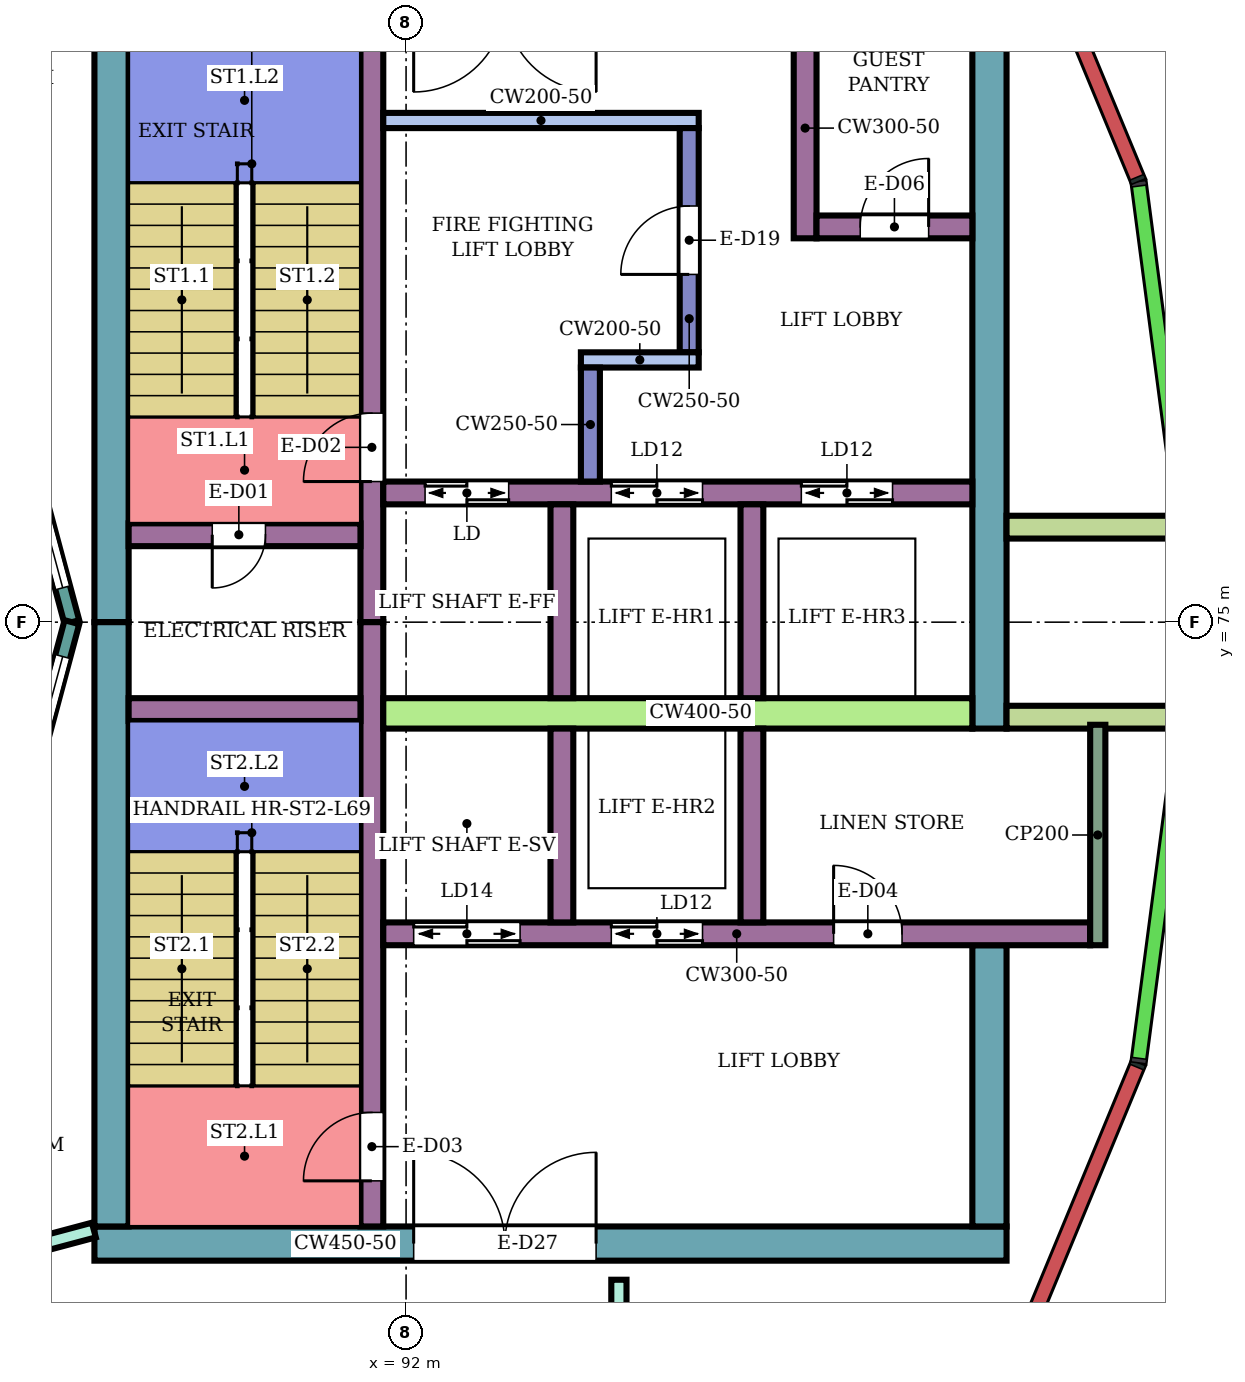
"""IFC4 building model, lengths in metres.
Left out: names, types, materials, properties, quantities, classifications, styles, units other than length and angle.
Written with IfcOpenShell. Run it as: python <this file> out.ifc"""

import sys

from ifc_helpers import new_model, si_unit, direction, frame, frame_2d, origin, place, context, subcontext, project, spatial, rectangle, extrude, element, fill, save


model = new_model("IFC4")
c1 = context("Model", 3, precision=1e-05, world=origin(), true_north=direction((0.0, 1.0)))
c2 = subcontext(c1, "Body", "Model", "MODEL_VIEW")
j1 = project(units=[si_unit("LENGTHUNIT", "METRE"), si_unit("PLANEANGLEUNIT", "RADIAN")], contexts=[c1])
p1 = place(None, origin())
s1 = spatial("IfcSite", under=j1, at=p1, CompositionType="ELEMENT")
p2 = place(p1, origin())
s2 = spatial("IfcBuilding", under=s1, at=p2, CompositionType="ELEMENT")
p3 = place(p2, frame((0.0, 0.0, 300.9)))
s3 = spatial("IfcBuildingStorey", under=s2, at=p3, CompositionType="ELEMENT", Elevation=300.9)
p4 = place(p3, frame((87.9, 66.825, 0.0), z_axis=(0.0, 0.0, 1.0), x_axis=(1.0, 0.0, 0.0)))
e1 = element("IfcWall", 1, at=p4, inside=s3, PredefinedType="SHEAR", context=c2, shape_type="SweptSolid", body=[
    extrude(rectangle(XDim=12.0, YDim=0.45, at=frame_2d((6.0, 0.0))), origin(), (0.0, 0.0, 1.0), 3.88),
])
p5 = place(p4, frame((4.2, 0.0, 0.0)))
e2 = element("IfcOpeningElement", 2, at=p5, cuts=e1, PredefinedType="OPENING", context=c2, shape_type="SweptSolid", body=[
    extrude(rectangle(XDim=2.4, YDim=2.4, at=frame_2d((1.2, 1.2))), frame((0.0, 0.235, 0.0), z_axis=(0.0, -1.0, 0.0), x_axis=(1.0, 0.0, 0.0)), (0.0, 0.0, 1.0), 0.47),
])
for number, where, z_axis, x_axis in (
    (3, (88.125, 75.0, 0.0), (0.0, 0.0, 1.0), (0.0, 1.0, 0.0)),
    (4, (88.125, 67.05, 0.0), (0.0, 0.0, 1.0), (0.0, 1.0, 0.0)),
):
    element("IfcWall", number, at=place(p3, frame(where, z_axis=z_axis, x_axis=x_axis)), inside=s3, PredefinedType="SHEAR", context=c2, shape_type="SweptSolid", body=[
        extrude(rectangle(XDim=7.95, YDim=0.45, at=frame_2d((3.975, 0.0))), origin(), (0.0, 0.0, 1.0), 3.88),
    ])
p6 = place(p3, frame((99.675, 73.6, 0.0), z_axis=(0.0, 0.0, 1.0), x_axis=(0.0, 1.0, 0.0)))
e5 = element("IfcWall", 5, at=p6, inside=s3, PredefinedType="SHEAR", context=c2, shape_type="SweptSolid", body=[
    extrude(rectangle(XDim=9.35, YDim=0.45, at=frame_2d((4.675, 0.0))), origin(), (0.0, 0.0, 1.0), 3.88),
])
p7 = place(p3, frame((99.675, 67.05, 0.0), z_axis=(0.0, 0.0, 1.0), x_axis=(0.0, 1.0, 0.0)))
e6 = element("IfcWall", 6, at=p7, inside=s3, PredefinedType="SHEAR", context=c2, shape_type="SweptSolid", body=[
    extrude(rectangle(XDim=3.7, YDim=0.45, at=frame_2d((1.85, 0.0))), origin(), (0.0, 0.0, 1.0), 3.88),
])
p8 = place(p3, frame((91.55, 75.0, 0.0), z_axis=(0.0, 0.0, 1.0), x_axis=(0.0, 1.0, 0.0)))
e7 = element("IfcWall", 7, at=p8, inside=s3, PredefinedType="SHEAR", context=c2, shape_type="SweptSolid", body=[
    extrude(rectangle(XDim=7.95, YDim=0.3, at=frame_2d((3.975, 0.0))), origin(), (0.0, 0.0, 1.0), 3.88),
])
p9 = place(p8, frame((1.85, 0.0, 0.0)))
e8 = element("IfcOpeningElement", 8, at=p9, cuts=e7, PredefinedType="OPENING", context=c2, shape_type="SweptSolid", body=[
    extrude(rectangle(XDim=0.9, YDim=2.1, at=frame_2d((0.45, 1.05))), frame((0.0, 0.16, 0.0), z_axis=(0.0, -1.0, 0.0), x_axis=(1.0, 0.0, 0.0)), (0.0, 0.0, 1.0), 0.32),
])
p10 = place(p3, frame((91.55, 67.05, 0.0), z_axis=(0.0, 0.0, 1.0), x_axis=(0.0, 1.0, 0.0)))
e9 = element("IfcWall", 9, at=p10, inside=s3, PredefinedType="SHEAR", context=c2, shape_type="SweptSolid", body=[
    extrude(rectangle(XDim=7.95, YDim=0.3, at=frame_2d((3.975, 0.0))), origin(), (0.0, 0.0, 1.0), 3.88),
])
p11 = place(p10, frame((0.6, 0.0, 0.0)))
e10 = element("IfcOpeningElement", 10, at=p11, cuts=e9, PredefinedType="OPENING", context=c2, shape_type="SweptSolid", body=[
    extrude(rectangle(XDim=0.9, YDim=2.1, at=frame_2d((0.45, 1.05))), frame((0.0, 0.16, 0.0), z_axis=(0.0, -1.0, 0.0), x_axis=(1.0, 0.0, 0.0)), (0.0, 0.0, 1.0), 0.32),
])
p12 = place(p3, frame((88.35, 76.15, 0.0), z_axis=(0.0, 0.0, 1.0), x_axis=(1.0, 0.0, 0.0)))
e11 = element("IfcWall", 11, at=p12, inside=s3, PredefinedType="SHEAR", context=c2, shape_type="SweptSolid", body=[
    extrude(rectangle(XDim=3.05, YDim=0.3, at=frame_2d((1.525, 0.0))), origin(), (0.0, 0.0, 1.0), 3.88),
])
p13 = place(p12, frame((1.1, 0.0, 0.0)))
e12 = element("IfcOpeningElement", 12, at=p13, cuts=e11, PredefinedType="OPENING", context=c2, shape_type="SweptSolid", body=[
    extrude(rectangle(XDim=0.7, YDim=2.0, at=frame_2d((0.35, 1.0))), frame((0.0, 0.16, 0.0), z_axis=(0.0, -1.0, 0.0), x_axis=(1.0, 0.0, 0.0)), (0.0, 0.0, 1.0), 0.32),
])
p14 = place(p3, frame((88.35, 73.85, 0.0), z_axis=(0.0, 0.0, 1.0), x_axis=(1.0, 0.0, 0.0)))
e13 = element("IfcWall", 13, at=p14, inside=s3, PredefinedType="SHEAR", context=c2, shape_type="SweptSolid", body=[
    extrude(rectangle(XDim=3.05, YDim=0.3, at=frame_2d((1.525, 0.0))), origin(), (0.0, 0.0, 1.0), 3.88),
])
p15 = place(p3, frame((91.7, 76.7, 0.0), z_axis=(0.0, 0.0, 1.0), x_axis=(1.0, 0.0, 0.0)))
e14 = element("IfcWall", 14, at=p15, inside=s3, PredefinedType="SHEAR", context=c2, shape_type="SweptSolid", body=[
    extrude(rectangle(XDim=7.75, YDim=0.3, at=frame_2d((3.875, 0.0))), origin(), (0.0, 0.0, 1.0), 3.88),
])
p16 = place(p15, frame((0.55, 0.0, 0.0)))
e15 = element("IfcOpeningElement", 15, at=p16, cuts=e14, PredefinedType="OPENING", context=c2, shape_type="SweptSolid", body=[
    extrude(rectangle(XDim=1.1, YDim=2.1, at=frame_2d((0.55, 1.05))), frame((0.0, 0.16, 0.0), z_axis=(0.0, -1.0, 0.0), x_axis=(1.0, 0.0, 0.0)), (0.0, 0.0, 1.0), 0.32),
])
p17 = place(p15, frame((3.0, 0.0, 0.0)))
e16 = element("IfcOpeningElement", 16, at=p17, cuts=e14, PredefinedType="OPENING", context=c2, shape_type="SweptSolid", body=[
    extrude(rectangle(XDim=1.2, YDim=2.1, at=frame_2d((0.6, 1.05))), frame((0.0, 0.16, 0.0), z_axis=(0.0, -1.0, 0.0), x_axis=(1.0, 0.0, 0.0)), (0.0, 0.0, 1.0), 0.32),
])
p18 = place(p15, frame((5.5, 0.0, 0.0)))
e17 = element("IfcOpeningElement", 17, at=p18, cuts=e14, PredefinedType="OPENING", context=c2, shape_type="SweptSolid", body=[
    extrude(rectangle(XDim=1.2, YDim=2.1, at=frame_2d((0.6, 1.05))), frame((0.0, 0.16, 0.0), z_axis=(0.0, -1.0, 0.0), x_axis=(1.0, 0.0, 0.0)), (0.0, 0.0, 1.0), 0.32),
])
p19 = place(p3, frame((91.7, 73.8, 0.0), z_axis=(0.0, 0.0, 1.0), x_axis=(1.0, 0.0, 0.0)))
e18 = element("IfcWall", 18, at=p19, inside=s3, PredefinedType="SHEAR", context=c2, shape_type="SweptSolid", body=[
    extrude(rectangle(XDim=7.75, YDim=0.4, at=frame_2d((3.875, 0.0))), origin(), (0.0, 0.0, 1.0), 3.88),
])
p20 = place(p3, frame((91.7, 70.9, 0.0), z_axis=(0.0, 0.0, 1.0), x_axis=(1.0, 0.0, 0.0)))
e19 = element("IfcWall", 19, at=p20, inside=s3, PredefinedType="SHEAR", context=c2, shape_type="SweptSolid", body=[
    extrude(rectangle(XDim=9.3, YDim=0.3, at=frame_2d((4.65, 0.0))), origin(), (0.0, 0.0, 1.0), 3.88),
])
p21 = place(p20, frame((0.4, 0.0, 0.0)))
e20 = element("IfcOpeningElement", 20, at=p21, cuts=e19, PredefinedType="OPENING", context=c2, shape_type="SweptSolid", body=[
    extrude(rectangle(XDim=1.4, YDim=2.1, at=frame_2d((0.7, 1.05))), frame((0.0, 0.16, 0.0), z_axis=(0.0, -1.0, 0.0), x_axis=(1.0, 0.0, 0.0)), (0.0, 0.0, 1.0), 0.32),
])
p22 = place(p20, frame((3.0, 0.0, 0.0)))
e21 = element("IfcOpeningElement", 21, at=p22, cuts=e19, PredefinedType="OPENING", context=c2, shape_type="SweptSolid", body=[
    extrude(rectangle(XDim=1.2, YDim=2.1, at=frame_2d((0.6, 1.05))), frame((0.0, 0.16, 0.0), z_axis=(0.0, -1.0, 0.0), x_axis=(1.0, 0.0, 0.0)), (0.0, 0.0, 1.0), 0.32),
])
p23 = place(p20, frame((5.925, 0.0, 0.0)))
e22 = element("IfcOpeningElement", 22, at=p23, cuts=e19, PredefinedType="OPENING", context=c2, shape_type="SweptSolid", body=[
    extrude(rectangle(XDim=0.9, YDim=2.1, at=frame_2d((0.45, 1.05))), frame((0.0, 0.16, 0.0), z_axis=(0.0, -1.0, 0.0), x_axis=(1.0, 0.0, 0.0)), (0.0, 0.0, 1.0), 0.32),
])
for number, where, z_axis, x_axis in (
    (23, (94.05, 74.0, 0.0), (0.0, 0.0, 1.0), (0.0, 1.0, 0.0)),
    (24, (96.55, 74.0, 0.0), (0.0, 0.0, 1.0), (0.0, 1.0, 0.0)),
    (25, (94.05, 71.05, 0.0), (0.0, 0.0, 1.0), (0.0, 1.0, 0.0)),
    (26, (96.55, 71.05, 0.0), (0.0, 0.0, 1.0), (0.0, 1.0, 0.0)),
):
    element("IfcWall", number, at=place(p3, frame(where, z_axis=z_axis, x_axis=x_axis)), inside=s3, PredefinedType="SHEAR", context=c2, shape_type="SweptSolid", body=[
        extrude(rectangle(XDim=2.55, YDim=0.3, at=frame_2d((1.275, 0.0))), origin(), (0.0, 0.0, 1.0), 3.88),
    ])
p24 = place(p3, frame((91.7, 81.6, 0.0), z_axis=(0.0, 0.0, 1.0), x_axis=(1.0, 0.0, 0.0)))
e27 = element("IfcWall", 27, at=p24, inside=s3, PredefinedType="SHEAR", context=c2, shape_type="SweptSolid", body=[
    extrude(rectangle(XDim=4.15, YDim=0.2, at=frame_2d((2.075, 0.0))), origin(), (0.0, 0.0, 1.0), 3.88),
])
p25 = place(p3, frame((95.725, 78.55, 0.0), z_axis=(0.0, 0.0, 1.0), x_axis=(0.0, 1.0, 0.0)))
e28 = element("IfcWall", 28, at=p25, inside=s3, PredefinedType="SHEAR", context=c2, shape_type="SweptSolid", body=[
    extrude(rectangle(XDim=2.95, YDim=0.25, at=frame_2d((1.475, 0.0))), origin(), (0.0, 0.0, 1.0), 3.88),
])
p26 = place(p25, frame((1.025, 0.0, 0.0)))
e29 = element("IfcOpeningElement", 29, at=p26, cuts=e28, PredefinedType="OPENING", context=c2, shape_type="SweptSolid", body=[
    extrude(rectangle(XDim=0.9, YDim=2.1, at=frame_2d((0.45, 1.05))), frame((0.0, 0.135, 0.0), z_axis=(0.0, -1.0, 0.0), x_axis=(1.0, 0.0, 0.0)), (0.0, 0.0, 1.0), 0.27),
])
p27 = place(p3, frame((94.3, 78.45, 0.0), z_axis=(0.0, 0.0, 1.0), x_axis=(1.0, 0.0, 0.0)))
e30 = element("IfcWall", 30, at=p27, inside=s3, PredefinedType="SHEAR", context=c2, shape_type="SweptSolid", body=[
    extrude(rectangle(XDim=1.55, YDim=0.2, at=frame_2d((0.775, 0.0))), origin(), (0.0, 0.0, 1.0), 3.88),
])
p28 = place(p3, frame((94.425, 76.85, 0.0), z_axis=(0.0, 0.0, 1.0), x_axis=(0.0, 1.0, 0.0)))
e31 = element("IfcWall", 31, at=p28, inside=s3, PredefinedType="SHEAR", context=c2, shape_type="SweptSolid", body=[
    extrude(rectangle(XDim=1.5, YDim=0.25, at=frame_2d((0.75, 0.0))), origin(), (0.0, 0.0, 1.0), 3.88),
])
p29 = place(p3, frame((97.25, 80.05, 0.0), z_axis=(0.0, 0.0, 1.0), x_axis=(0.0, 1.0, 0.0)))
e32 = element("IfcWall", 32, at=p29, inside=s3, PredefinedType="SHEAR", context=c2, shape_type="SweptSolid", body=[
    extrude(rectangle(XDim=2.9, YDim=0.3, at=frame_2d((1.45, 0.0))), origin(), (0.0, 0.0, 1.0), 3.88),
])
p30 = place(p3, frame((97.4, 80.2, 0.0), z_axis=(0.0, 0.0, 1.0), x_axis=(1.0, 0.0, 0.0)))
e33 = element("IfcWall", 33, at=p30, inside=s3, PredefinedType="SHEAR", context=c2, shape_type="SweptSolid", body=[
    extrude(rectangle(XDim=2.05, YDim=0.3, at=frame_2d((1.025, 0.0))), origin(), (0.0, 0.0, 1.0), 3.88),
])
p31 = place(p30, frame((0.575, 0.0, 0.0)))
e34 = element("IfcOpeningElement", 34, at=p31, cuts=e33, PredefinedType="OPENING", context=c2, shape_type="SweptSolid", body=[
    extrude(rectangle(XDim=0.9, YDim=2.1, at=frame_2d((0.45, 1.05))), frame((0.0, 0.16, 0.0), z_axis=(0.0, -1.0, 0.0), x_axis=(1.0, 0.0, 0.0)), (0.0, 0.0, 1.0), 0.32),
])
for number, where, z_axis, x_axis in (
    (35, (99.9, 73.75, 0.0), (0.0, 0.0, 1.0), (1.0, 0.0, 0.0)),
    (36, (99.9, 76.25, 0.0), (0.0, 0.0, 1.0), (1.0, 0.0, 0.0)),
):
    element("IfcWall", number, at=place(p3, frame(where, z_axis=z_axis, x_axis=x_axis)), inside=s3, PredefinedType="NOTDEFINED", context=c2, shape_type="SweptSolid", body=[
        extrude(rectangle(XDim=2.416, YDim=0.3, at=frame_2d((1.208, 0.0))), origin(), (0.0, 0.0, 1.0), 4.2),
    ])
p32 = place(p3, frame((87.604, 75.0, 0.0), z_axis=(0.0, 0.0, 1.0), x_axis=(-0.258789828301, 0.965933654434, 0.0)))
e37 = element("IfcWall", 37, at=p32, inside=s3, PredefinedType="NOTDEFINED", context=c2, shape_type="SweptSolid", body=[
    extrude(rectangle(XDim=3.936, YDim=0.2, at=frame_2d((1.968, 0.0))), origin(), (0.0, 0.0, 1.0), 4.2),
])
p33 = place(p32, frame((0.468, 0.0, 0.9)))
e38 = element("IfcOpeningElement", 38, at=p33, cuts=e37, PredefinedType="OPENING", context=c2, shape_type="SweptSolid", body=[
    extrude(rectangle(XDim=3.0, YDim=2.3, at=frame_2d((1.5, 1.15))), frame((0.0, 0.11, 0.0), z_axis=(0.0, -1.0, 0.0), x_axis=(1.0, 0.0, 0.0)), (0.0, 0.0, 1.0), 0.22),
])
p34 = place(p3, frame((86.585, 71.198, 0.0), z_axis=(0.0, 0.0, 1.0), x_axis=(0.258789828301, 0.965933654434, 0.0)))
e39 = element("IfcWall", 39, at=p34, inside=s3, PredefinedType="NOTDEFINED", context=c2, shape_type="SweptSolid", body=[
    extrude(rectangle(XDim=3.936, YDim=0.2, at=frame_2d((1.968, 0.0))), origin(), (0.0, 0.0, 1.0), 4.2),
])
p35 = place(p34, frame((0.468, 0.0, 0.9)))
e40 = element("IfcOpeningElement", 40, at=p35, cuts=e39, PredefinedType="OPENING", context=c2, shape_type="SweptSolid", body=[
    extrude(rectangle(XDim=3.0, YDim=2.3, at=frame_2d((1.5, 1.15))), frame((0.0, 0.11, 0.0), z_axis=(0.0, -1.0, 0.0), x_axis=(1.0, 0.0, 0.0)), (0.0, 0.0, 1.0), 0.22),
])
p36 = place(p3, frame((80.125, 64.932, 0.0), z_axis=(0.0, 0.0, 1.0), x_axis=(0.966236955806, 0.257655089674, 0.0)))
e41 = element("IfcWall", 41, at=p36, inside=s3, PredefinedType="PARTITIONING", context=c2, shape_type="SweptSolid", body=[
    extrude(rectangle(XDim=8.039, YDim=0.2, at=frame_2d((4.02, 0.0))), origin(), (0.0, 0.0, 1.0), 3.75),
])
p37 = place(p36, frame((6.298, 0.0, 0.0)))
e42 = element("IfcOpeningElement", 42, at=p37, cuts=e41, PredefinedType="OPENING", context=c2, shape_type="SweptSolid", body=[
    extrude(rectangle(XDim=0.9, YDim=2.1, at=frame_2d((0.45, 1.05))), frame((0.0, 0.11, 0.0), z_axis=(0.0, -1.0, 0.0), x_axis=(1.0, 0.0, 0.0)), (0.0, 0.0, 1.0), 0.22),
])
p38 = place(p36, frame((2.045, 0.0, 0.0)))
e43 = element("IfcOpeningElement", 43, at=p38, cuts=e41, PredefinedType="OPENING", context=c2, shape_type="SweptSolid", body=[
    extrude(rectangle(XDim=0.9, YDim=2.1, at=frame_2d((0.45, 1.05))), frame((0.0, 0.11, 0.0), z_axis=(0.0, -1.0, 0.0), x_axis=(1.0, 0.0, 0.0)), (0.0, 0.0, 1.0), 0.22),
])
p39 = place(p3, frame((94.8, 65.1, 0.0), z_axis=(0.0, 0.0, 1.0), x_axis=(0.0, 1.0, 0.0)))
e44 = element("IfcWall", 44, at=p39, inside=s3, PredefinedType="PARTITIONING", context=c2, shape_type="SweptSolid", body=[
    extrude(rectangle(XDim=1.249, YDim=0.2, at=frame_2d((0.625, 0.0))), origin(), (0.0, 0.0, 1.0), 3.75),
])
p40 = place(p3, frame((101.1, 70.75, 0.0), z_axis=(0.0, 0.0, 1.0), x_axis=(0.0, 1.0, 0.0)))
e45 = element("IfcWall", 45, at=p40, inside=s3, PredefinedType="PARTITIONING", context=c2, shape_type="SweptSolid", body=[
    extrude(rectangle(XDim=2.9, YDim=0.2, at=frame_2d((1.45, 0.0))), origin(), (0.0, 0.0, 1.0), 3.88),
])
p41 = place(p33, origin())
e46 = element("IfcWindow", 46, at=p41, inside=s3, PartitioningType="SINGLE_PANEL", PredefinedType="WINDOW", context=c2, shape_type="SweptSolid", body=[
    extrude(rectangle(XDim=3.0, YDim=2.3, at=frame_2d((1.5, 1.15))), frame((0.0, 0.03, 0.0), z_axis=(0.0, -1.0, 0.0), x_axis=(1.0, 0.0, 0.0)), (0.0, 0.0, 1.0), 0.06),
])
fill(e38, e46)
p42 = place(p35, origin())
e47 = element("IfcWindow", 47, at=p42, inside=s3, PartitioningType="SINGLE_PANEL", PredefinedType="WINDOW", context=c2, shape_type="SweptSolid", body=[
    extrude(rectangle(XDim=3.0, YDim=2.3, at=frame_2d((1.5, 1.15))), frame((0.0, 0.03, 0.0), z_axis=(0.0, -1.0, 0.0), x_axis=(1.0, 0.0, 0.0)), (0.0, 0.0, 1.0), 0.06),
])
fill(e40, e47)
p43 = place(p13, frame((0.7, 0.0, 0.0), z_axis=(0.0, 0.0, 1.0), x_axis=(-1.0, 0.0, 0.0)))
e48 = element("IfcDoor", 48, at=p43, inside=s3, OperationType="SINGLE_SWING_RIGHT", PredefinedType="DOOR", context=c2, shape_type="SweptSolid", body=[
    extrude(rectangle(XDim=0.7, YDim=2.0, at=frame_2d((0.35, 1.0))), frame((0.0, 0.025, 0.0), z_axis=(0.0, -1.0, 0.0), x_axis=(1.0, 0.0, 0.0)), (0.0, 0.0, 1.0), 0.05),
])
fill(e12, e48)
p44 = place(p9, origin())
e49 = element("IfcDoor", 49, at=p44, inside=s3, OperationType="SINGLE_SWING_LEFT", PredefinedType="DOOR", context=c2, shape_type="SweptSolid", body=[
    extrude(rectangle(XDim=0.9, YDim=2.1, at=frame_2d((0.45, 1.05))), frame((0.0, 0.025, 0.0), z_axis=(0.0, -1.0, 0.0), x_axis=(1.0, 0.0, 0.0)), (0.0, 0.0, 1.0), 0.05),
])
fill(e8, e49)
p45 = place(p11, origin())
e50 = element("IfcDoor", 50, at=p45, inside=s3, OperationType="SINGLE_SWING_LEFT", PredefinedType="DOOR", context=c2, shape_type="SweptSolid", body=[
    extrude(rectangle(XDim=0.9, YDim=2.1, at=frame_2d((0.45, 1.05))), frame((0.0, 0.025, 0.0), z_axis=(0.0, -1.0, 0.0), x_axis=(1.0, 0.0, 0.0)), (0.0, 0.0, 1.0), 0.05),
])
fill(e10, e50)
p46 = place(p16, origin())
e51 = element("IfcDoor", 51, at=p46, inside=s3, OperationType="DOUBLE_DOOR_SLIDING", PredefinedType="DOOR", context=c2, shape_type="SweptSolid", body=[
    extrude(rectangle(XDim=1.1, YDim=2.1, at=frame_2d((0.55, 1.05))), frame((0.0, 0.025, 0.0), z_axis=(0.0, -1.0, 0.0), x_axis=(1.0, 0.0, 0.0)), (0.0, 0.0, 1.0), 0.05),
])
fill(e15, e51)
p47 = place(p17, origin())
e52 = element("IfcDoor", 52, at=p47, inside=s3, OperationType="DOUBLE_DOOR_SLIDING", PredefinedType="DOOR", context=c2, shape_type="SweptSolid", body=[
    extrude(rectangle(XDim=1.2, YDim=2.1, at=frame_2d((0.6, 1.05))), frame((0.0, 0.025, 0.0), z_axis=(0.0, -1.0, 0.0), x_axis=(1.0, 0.0, 0.0)), (0.0, 0.0, 1.0), 0.05),
])
fill(e16, e52)
p48 = place(p18, origin())
e53 = element("IfcDoor", 53, at=p48, inside=s3, OperationType="DOUBLE_DOOR_SLIDING", PredefinedType="DOOR", context=c2, shape_type="SweptSolid", body=[
    extrude(rectangle(XDim=1.2, YDim=2.1, at=frame_2d((0.6, 1.05))), frame((0.0, 0.025, 0.0), z_axis=(0.0, -1.0, 0.0), x_axis=(1.0, 0.0, 0.0)), (0.0, 0.0, 1.0), 0.05),
])
fill(e17, e53)
p49 = place(p21, origin())
e54 = element("IfcDoor", 54, at=p49, inside=s3, OperationType="DOUBLE_DOOR_SLIDING", PredefinedType="DOOR", context=c2, shape_type="SweptSolid", body=[
    extrude(rectangle(XDim=1.4, YDim=2.1, at=frame_2d((0.7, 1.05))), frame((0.0, 0.025, 0.0), z_axis=(0.0, -1.0, 0.0), x_axis=(1.0, 0.0, 0.0)), (0.0, 0.0, 1.0), 0.05),
])
fill(e20, e54)
p50 = place(p22, origin())
e55 = element("IfcDoor", 55, at=p50, inside=s3, OperationType="DOUBLE_DOOR_SLIDING", PredefinedType="DOOR", context=c2, shape_type="SweptSolid", body=[
    extrude(rectangle(XDim=1.2, YDim=2.1, at=frame_2d((0.6, 1.05))), frame((0.0, 0.025, 0.0), z_axis=(0.0, -1.0, 0.0), x_axis=(1.0, 0.0, 0.0)), (0.0, 0.0, 1.0), 0.05),
])
fill(e21, e55)
p51 = place(p23, origin())
e56 = element("IfcDoor", 56, at=p51, inside=s3, OperationType="SINGLE_SWING_LEFT", PredefinedType="DOOR", context=c2, shape_type="SweptSolid", body=[
    extrude(rectangle(XDim=0.9, YDim=2.1, at=frame_2d((0.45, 1.05))), frame((0.0, 0.025, 0.0), z_axis=(0.0, -1.0, 0.0), x_axis=(1.0, 0.0, 0.0)), (0.0, 0.0, 1.0), 0.05),
])
fill(e22, e56)
p52 = place(p26, origin())
e57 = element("IfcDoor", 57, at=p52, inside=s3, OperationType="SINGLE_SWING_LEFT", PredefinedType="DOOR", context=c2, shape_type="SweptSolid", body=[
    extrude(rectangle(XDim=0.9, YDim=2.1, at=frame_2d((0.45, 1.05))), frame((0.0, 0.025, 0.0), z_axis=(0.0, -1.0, 0.0), x_axis=(1.0, 0.0, 0.0)), (0.0, 0.0, 1.0), 0.05),
])
fill(e29, e57)
p53 = place(p31, origin())
e58 = element("IfcDoor", 58, at=p53, inside=s3, OperationType="SINGLE_SWING_RIGHT", PredefinedType="DOOR", context=c2, shape_type="SweptSolid", body=[
    extrude(rectangle(XDim=0.9, YDim=2.1, at=frame_2d((0.45, 1.05))), frame((0.0, 0.025, 0.0), z_axis=(0.0, -1.0, 0.0), x_axis=(1.0, 0.0, 0.0)), (0.0, 0.0, 1.0), 0.05),
])
fill(e34, e58)
p54 = place(p5, origin())
e59 = element("IfcDoor", 59, at=p54, inside=s3, OperationType="DOUBLE_DOOR_SINGLE_SWING", PredefinedType="DOOR", context=c2, shape_type="SweptSolid", body=[
    extrude(rectangle(XDim=2.4, YDim=2.4, at=frame_2d((1.2, 1.2))), frame((0.0, 0.025, 0.0), z_axis=(0.0, -1.0, 0.0), x_axis=(1.0, 0.0, 0.0)), (0.0, 0.0, 1.0), 0.05),
])
fill(e2, e59)
save(model, sys.argv[1])
